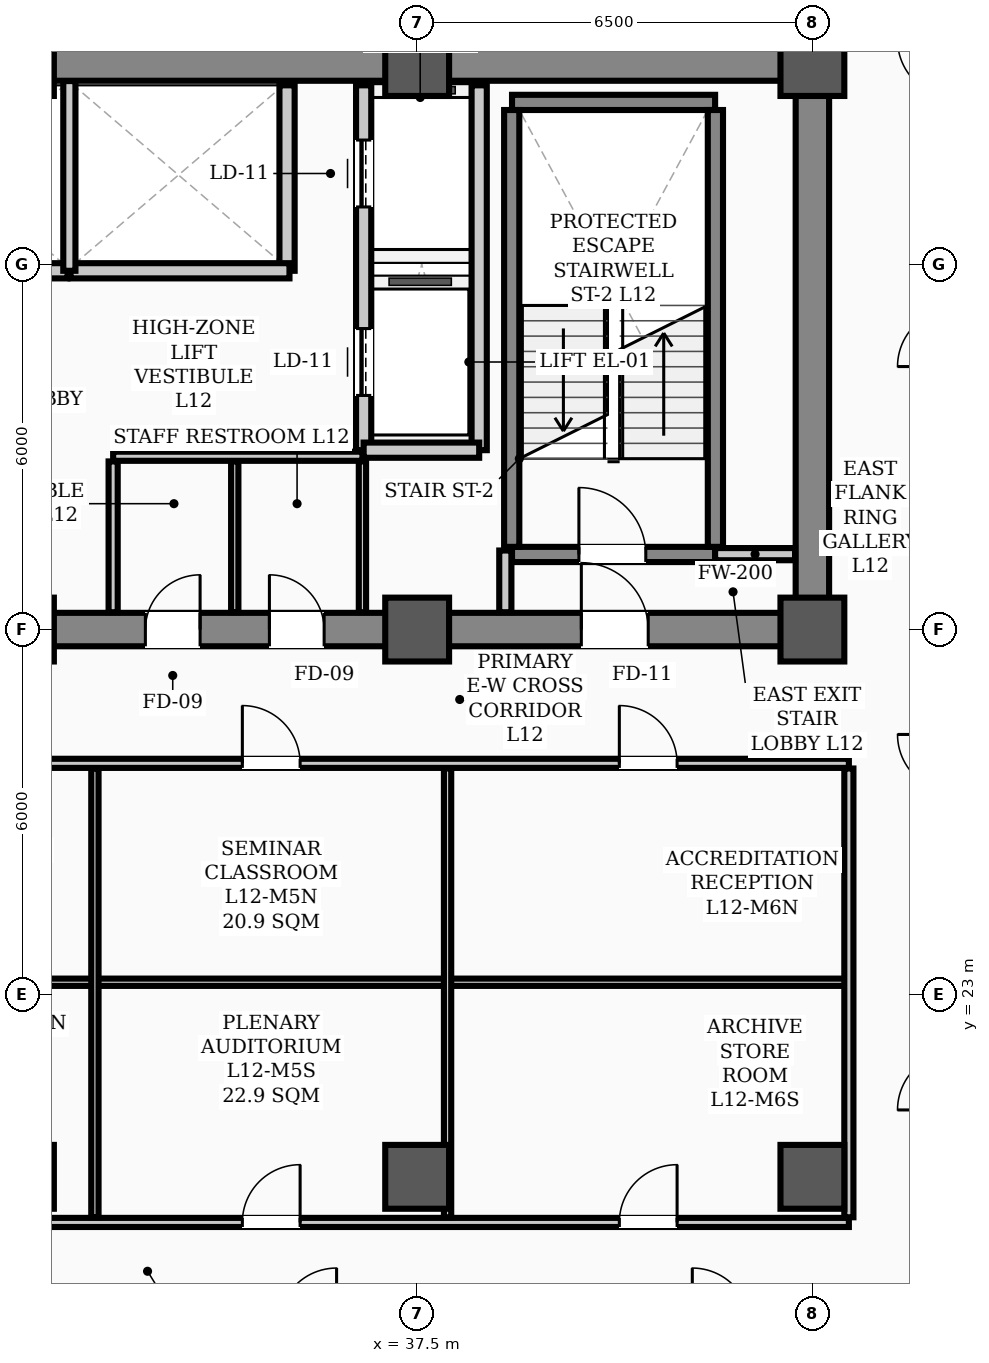
"""IFC4 building model, lengths in metres.
Left out: names, types, materials, properties, quantities, classifications, styles, units other than length and angle.
Written with IfcOpenShell. Run it as: python <this file> out.ifc"""

import sys

from ifc_helpers import new_model, si_unit, direction, frame, frame_2d, origin, origin_2d, place, context, subcontext, project, spatial, rectangle, hollow_rectangle, extrude, element, fill, save


model = new_model("IFC4")
c1 = context("Model", 3, precision=1e-05, world=origin(), true_north=direction((0.0, 1.0)))
c2 = subcontext(c1, "Body", "Model", "MODEL_VIEW")
j1 = project(units=[si_unit("LENGTHUNIT", "METRE"), si_unit("PLANEANGLEUNIT", "RADIAN")], contexts=[c1])
p1 = place(None, origin())
s1 = spatial("IfcSite", under=j1, at=p1, CompositionType="ELEMENT")
p2 = place(p1, origin())
s2 = spatial("IfcBuilding", under=s1, at=p2, CompositionType="ELEMENT")
p3 = place(p2, frame((0.0, 0.0, 49.9)))
s3 = spatial("IfcBuildingStorey", under=s2, at=p3, CompositionType="ELEMENT", Elevation=49.9)
for number, where, z_axis, x_axis in (
    (1, (31.0, 29.0, 0.0), (0.0, 0.0, 1.0), (1.0, 0.0, 0.0)),
    (2, (31.0, 38.3, 0.0), (0.0, 0.0, 1.0), (1.0, 0.0, 0.0)),
    (3, (37.5, 29.0, 0.0), (0.0, 0.0, 1.0), (1.0, 0.0, 0.0)),
    (4, (37.5, 38.3, 0.0), (0.0, 0.0, 1.0), (1.0, 0.0, 0.0)),
    (5, (44.0, 29.0, 0.0), (0.0, 0.0, 1.0), (1.0, 0.0, 0.0)),
    (6, (44.0, 38.3, 0.0), (0.0, 0.0, 1.0), (1.0, 0.0, 0.0)),
    (7, (31.0, 20.0, 0.0), (0.0, 0.0, 1.0), (1.0, 0.0, 0.0)),
    (8, (37.5, 20.0, 0.0), (0.0, 0.0, 1.0), (1.0, 0.0, 0.0)),
    (9, (44.0, 20.0, 0.0), (0.0, 0.0, 1.0), (1.0, 0.0, 0.0)),
):
    element("IfcColumn", number, at=place(p3, frame(where, z_axis=z_axis, x_axis=x_axis)), inside=s3, PredefinedType="COLUMN", context=c2, shape_type="SweptSolid", body=[
        extrude(hollow_rectangle(XDim=1.05, YDim=1.05, WallThickness=0.038, InnerFilletRadius=0.019, OuterFilletRadius=0.057, at=origin_2d()), origin(), (0.0, 0.0, 1.0), 3.9),
    ])
p4 = place(p3, frame((13.5, 29.0, 0.0), z_axis=(0.0, 0.0, 1.0), x_axis=(1.0, 0.0, 0.0)))
e10 = element("IfcWall", 10, at=p4, inside=s3, PredefinedType="SHEAR", context=c2, shape_type="SweptSolid", body=[
    extrude(rectangle(XDim=30.5, YDim=0.55, at=frame_2d((15.25, 0.0))), origin(), (0.0, 0.0, 1.0), 3.66),
])
p5 = place(p4, frame((1.75, 0.0, 0.0)))
e11 = element("IfcOpeningElement", 11, at=p5, cuts=e10, PredefinedType="OPENING", context=c2, shape_type="SweptSolid", body=[
    extrude(rectangle(XDim=1.1, YDim=2.08, at=frame_2d((0.55, 1.04))), frame((0.0, 0.285, 0.0), z_axis=(0.0, -1.0, 0.0), x_axis=(1.0, 0.0, 0.0)), (0.0, 0.0, 1.0), 0.57),
])
p6 = place(p4, frame((26.7, 0.0, 0.0)))
e12 = element("IfcOpeningElement", 12, at=p6, cuts=e10, PredefinedType="OPENING", context=c2, shape_type="SweptSolid", body=[
    extrude(rectangle(XDim=1.1, YDim=2.08, at=frame_2d((0.55, 1.04))), frame((0.0, 0.285, 0.0), z_axis=(0.0, -1.0, 0.0), x_axis=(1.0, 0.0, 0.0)), (0.0, 0.0, 1.0), 0.57),
])
p7 = place(p4, frame((6.8, 0.0, 0.0)))
e13 = element("IfcOpeningElement", 13, at=p7, cuts=e10, PredefinedType="OPENING", context=c2, shape_type="SweptSolid", body=[
    extrude(rectangle(XDim=1.1, YDim=2.08, at=frame_2d((0.55, 1.04))), frame((0.0, 0.285, 0.0), z_axis=(0.0, -1.0, 0.0), x_axis=(1.0, 0.0, 0.0)), (0.0, 0.0, 1.0), 0.57),
])
p8 = place(p4, frame((13.2, 0.0, 0.0)))
e14 = element("IfcOpeningElement", 14, at=p8, cuts=e10, PredefinedType="OPENING", context=c2, shape_type="SweptSolid", body=[
    extrude(rectangle(XDim=1.6, YDim=2.08, at=frame_2d((0.8, 1.04))), frame((0.0, 0.285, 0.0), z_axis=(0.0, -1.0, 0.0), x_axis=(1.0, 0.0, 0.0)), (0.0, 0.0, 1.0), 0.57),
])
p9 = place(p4, frame((19.53, 0.0, 0.0)))
e15 = element("IfcOpeningElement", 15, at=p9, cuts=e10, PredefinedType="OPENING", context=c2, shape_type="SweptSolid", body=[
    extrude(rectangle(XDim=0.9, YDim=2.08, at=frame_2d((0.45, 1.04))), frame((0.0, 0.285, 0.0), z_axis=(0.0, -1.0, 0.0), x_axis=(1.0, 0.0, 0.0)), (0.0, 0.0, 1.0), 0.57),
])
p10 = place(p4, frame((21.57, 0.0, 0.0)))
e16 = element("IfcOpeningElement", 16, at=p10, cuts=e10, PredefinedType="OPENING", context=c2, shape_type="SweptSolid", body=[
    extrude(rectangle(XDim=0.9, YDim=2.08, at=frame_2d((0.45, 1.04))), frame((0.0, 0.285, 0.0), z_axis=(0.0, -1.0, 0.0), x_axis=(1.0, 0.0, 0.0)), (0.0, 0.0, 1.0), 0.57),
])
p11 = place(p3, frame((13.5, 38.3, 0.0), z_axis=(0.0, 0.0, 1.0), x_axis=(1.0, 0.0, 0.0)))
e17 = element("IfcWall", 17, at=p11, inside=s3, PredefinedType="SHEAR", context=c2, shape_type="SweptSolid", body=[
    extrude(rectangle(XDim=30.5, YDim=0.55, at=frame_2d((15.25, 0.0))), origin(), (0.0, 0.0, 1.0), 3.66),
])
p12 = place(p3, frame((44.0, 29.35, 0.0), z_axis=(0.0, 0.0, 1.0), x_axis=(0.0, 1.0, 0.0)))
e18 = element("IfcWall", 18, at=p12, inside=s3, PredefinedType="SHEAR", context=c2, shape_type="SweptSolid", body=[
    extrude(rectangle(XDim=8.6, YDim=0.55, at=frame_2d((4.3, 0.0))), origin(), (0.0, 0.0, 1.0), 3.66),
])
p13 = place(p3, frame((39.06, 30.235, 0.0), z_axis=(0.0, 0.0, 1.0), x_axis=(1.0, 0.0, 0.0)))
e19 = element("IfcWall", 19, at=p13, inside=s3, PredefinedType="STANDARD", context=c2, shape_type="SweptSolid", body=[
    extrude(rectangle(XDim=3.34, YDim=0.25, at=frame_2d((1.67, 0.0))), origin(), (0.0, 0.0, 1.0), 3.66),
])
p14 = place(p13, frame((1.1, 0.0, 0.0)))
e20 = element("IfcOpeningElement", 20, at=p14, cuts=e19, PredefinedType="OPENING", context=c2, shape_type="SweptSolid", body=[
    extrude(rectangle(XDim=1.1, YDim=2.08, at=frame_2d((0.55, 1.04))), frame((0.0, 0.135, 0.0), z_axis=(0.0, -1.0, 0.0), x_axis=(1.0, 0.0, 0.0)), (0.0, 0.0, 1.0), 0.27),
])
p15 = place(p3, frame((39.06, 37.669, 0.0), z_axis=(0.0, 0.0, 1.0), x_axis=(1.0, 0.0, 0.0)))
e21 = element("IfcWall", 21, at=p15, inside=s3, PredefinedType="STANDARD", context=c2, shape_type="SweptSolid", body=[
    extrude(rectangle(XDim=3.34, YDim=0.25, at=frame_2d((1.67, 0.0))), origin(), (0.0, 0.0, 1.0), 3.66),
])
for number, where, z_axis, x_axis in (
    (22, (39.055, 30.36, 0.0), (0.0, 0.0, 1.0), (0.0, 1.0, 0.0)),
    (23, (42.405, 30.36, 0.0), (0.0, 0.0, 1.0), (0.0, 1.0, 0.0)),
):
    element("IfcWall", number, at=place(p3, frame(where, z_axis=z_axis, x_axis=x_axis)), inside=s3, PredefinedType="STANDARD", context=c2, shape_type="SweptSolid", body=[
        extrude(rectangle(XDim=7.184, YDim=0.25, at=frame_2d((3.592, 0.0))), origin(), (0.0, 0.0, 1.0), 3.66),
    ])
p16 = place(p3, frame((36.62, 31.95, 0.0), z_axis=(0.0, 0.0, 1.0), x_axis=(0.0, 1.0, 0.0)))
e24 = element("IfcWall", 24, at=p16, inside=s3, PredefinedType="STANDARD", context=c2, shape_type="SweptSolid", body=[
    extrude(rectangle(XDim=6.0, YDim=0.25, at=frame_2d((3.0, 0.0))), origin(), (0.0, 0.0, 1.0), 2.24),
])
p17 = place(p16, frame((0.9, 0.0, 0.0)))
e25 = element("IfcOpeningElement", 25, at=p17, cuts=e24, PredefinedType="OPENING", context=c2, shape_type="SweptSolid", body=[
    extrude(rectangle(XDim=1.1, YDim=2.08, at=frame_2d((0.55, 1.04))), frame((0.0, 0.135, 0.0), z_axis=(0.0, -1.0, 0.0), x_axis=(1.0, 0.0, 0.0)), (0.0, 0.0, 1.0), 0.27),
])
p18 = place(p16, frame((4.0, 0.0, 0.0)))
e26 = element("IfcOpeningElement", 26, at=p18, cuts=e24, PredefinedType="OPENING", context=c2, shape_type="SweptSolid", body=[
    extrude(rectangle(XDim=1.1, YDim=2.08, at=frame_2d((0.55, 1.04))), frame((0.0, 0.135, 0.0), z_axis=(0.0, -1.0, 0.0), x_axis=(1.0, 0.0, 0.0)), (0.0, 0.0, 1.0), 0.27),
])
p19 = place(p3, frame((38.52, 31.95, 0.0), z_axis=(0.0, 0.0, 1.0), x_axis=(0.0, 1.0, 0.0)))
e27 = element("IfcWall", 27, at=p19, inside=s3, PredefinedType="STANDARD", context=c2, shape_type="SweptSolid", body=[
    extrude(rectangle(XDim=6.0, YDim=0.25, at=frame_2d((3.0, 0.0))), origin(), (0.0, 0.0, 1.0), 2.24),
])
p20 = place(p3, frame((36.62, 31.95, 0.0), z_axis=(0.0, 0.0, 1.0), x_axis=(1.0, 0.0, 0.0)))
e28 = element("IfcWall", 28, at=p20, inside=s3, PredefinedType="STANDARD", context=c2, shape_type="SweptSolid", body=[
    extrude(rectangle(XDim=1.9, YDim=0.25, at=frame_2d((0.95, 0.0))), origin(), (0.0, 0.0, 1.0), 3.48),
])
p21 = place(p3, frame((35.36, 34.9, 0.0), z_axis=(0.0, 0.0, 1.0), x_axis=(0.0, 1.0, 0.0)))
e29 = element("IfcWall", 29, at=p21, inside=s3, PredefinedType="STANDARD", context=c2, shape_type="SweptSolid", body=[
    extrude(rectangle(XDim=3.05, YDim=0.25, at=frame_2d((1.525, 0.0))), origin(), (0.0, 0.0, 1.0), 2.24),
])
p22 = place(p3, frame((28.2, 34.9, 0.0), z_axis=(0.0, 0.0, 1.0), x_axis=(1.0, 0.0, 0.0)))
e30 = element("IfcWall", 30, at=p22, inside=s3, PredefinedType="STANDARD", context=c2, shape_type="SweptSolid", body=[
    extrude(rectangle(XDim=3.55, YDim=0.25, at=frame_2d((1.775, 0.0))), origin(), (0.0, 0.0, 1.0), 3.66),
])
p23 = place(p3, frame((31.8, 34.9, 0.0), z_axis=(0.0, 0.0, 1.0), x_axis=(1.0, 0.0, 0.0)))
e31 = element("IfcWall", 31, at=p23, inside=s3, PredefinedType="STANDARD", context=c2, shape_type="SweptSolid", body=[
    extrude(rectangle(XDim=3.6, YDim=0.25, at=frame_2d((1.8, 0.0))), origin(), (0.0, 0.0, 1.0), 3.66),
])
p24 = place(p3, frame((42.4, 30.24, 0.0), z_axis=(0.0, 0.0, 1.0), x_axis=(1.0, 0.0, 0.0)))
e32 = element("IfcWall", 32, at=p24, inside=s3, PredefinedType="STANDARD", context=c2, shape_type="SweptSolid", body=[
    extrude(rectangle(XDim=1.315, YDim=0.2, at=frame_2d((0.658, 0.0))), origin(), (0.0, 0.0, 1.0), 2.24),
])
p25 = place(p3, frame((32.5, 31.85, 0.0), z_axis=(0.0, 0.0, 1.0), x_axis=(1.0, 0.0, 0.0)))
e33 = element("IfcWall", 33, at=p25, inside=s3, PredefinedType="PARTITIONING", context=c2, shape_type="SweptSolid", body=[
    extrude(rectangle(XDim=4.1, YDim=0.15, at=frame_2d((2.05, 0.0))), origin(), (0.0, 0.0, 1.0), 3.66),
])
p26 = place(p3, frame((12.9, 26.8, 0.0), z_axis=(0.0, 0.0, 1.0), x_axis=(1.0, 0.0, 0.0)))
e34 = element("IfcWall", 34, at=p26, inside=s3, PredefinedType="PARTITIONING", context=c2, shape_type="SweptSolid", body=[
    extrude(rectangle(XDim=31.7, YDim=0.15, at=frame_2d((15.85, 0.0))), origin(), (0.0, 0.0, 1.0), 2.24),
])
p27 = place(p26, frame((13.6, 0.0, 0.0)))
e35 = element("IfcOpeningElement", 35, at=p27, cuts=e34, PredefinedType="OPENING", context=c2, shape_type="SweptSolid", body=[
    extrude(rectangle(XDim=1.6, YDim=2.08, at=frame_2d((0.8, 1.04))), frame((0.0, 0.085, 0.0), z_axis=(0.0, -1.0, 0.0), x_axis=(1.0, 0.0, 0.0)), (0.0, 0.0, 1.0), 0.17),
])
p28 = place(p26, frame((2.175, 0.0, 0.0)))
e36 = element("IfcOpeningElement", 36, at=p28, cuts=e34, PredefinedType="OPENING", context=c2, shape_type="SweptSolid", body=[
    extrude(rectangle(XDim=0.95, YDim=2.08, at=frame_2d((0.475, 1.04))), frame((0.0, 0.085, 0.0), z_axis=(0.0, -1.0, 0.0), x_axis=(1.0, 0.0, 0.0)), (0.0, 0.0, 1.0), 0.17),
])
p29 = place(p26, frame((6.925, 0.0, 0.0)))
e37 = element("IfcOpeningElement", 37, at=p29, cuts=e34, PredefinedType="OPENING", context=c2, shape_type="SweptSolid", body=[
    extrude(rectangle(XDim=0.95, YDim=2.08, at=frame_2d((0.475, 1.04))), frame((0.0, 0.085, 0.0), z_axis=(0.0, -1.0, 0.0), x_axis=(1.0, 0.0, 0.0)), (0.0, 0.0, 1.0), 0.17),
])
p30 = place(p26, frame((10.925, 0.0, 0.0)))
e38 = element("IfcOpeningElement", 38, at=p30, cuts=e34, PredefinedType="OPENING", context=c2, shape_type="SweptSolid", body=[
    extrude(rectangle(XDim=0.95, YDim=2.08, at=frame_2d((0.475, 1.04))), frame((0.0, 0.085, 0.0), z_axis=(0.0, -1.0, 0.0), x_axis=(1.0, 0.0, 0.0)), (0.0, 0.0, 1.0), 0.17),
])
p31 = place(p26, frame((16.025, 0.0, 0.0)))
e39 = element("IfcOpeningElement", 39, at=p31, cuts=e34, PredefinedType="OPENING", context=c2, shape_type="SweptSolid", body=[
    extrude(rectangle(XDim=0.95, YDim=2.08, at=frame_2d((0.475, 1.04))), frame((0.0, 0.085, 0.0), z_axis=(0.0, -1.0, 0.0), x_axis=(1.0, 0.0, 0.0)), (0.0, 0.0, 1.0), 0.17),
])
p32 = place(p26, frame((21.725, 0.0, 0.0)))
e40 = element("IfcOpeningElement", 40, at=p32, cuts=e34, PredefinedType="OPENING", context=c2, shape_type="SweptSolid", body=[
    extrude(rectangle(XDim=0.95, YDim=2.08, at=frame_2d((0.475, 1.04))), frame((0.0, 0.085, 0.0), z_axis=(0.0, -1.0, 0.0), x_axis=(1.0, 0.0, 0.0)), (0.0, 0.0, 1.0), 0.17),
])
p33 = place(p26, frame((27.925, 0.0, 0.0)))
e41 = element("IfcOpeningElement", 41, at=p33, cuts=e34, PredefinedType="OPENING", context=c2, shape_type="SweptSolid", body=[
    extrude(rectangle(XDim=0.95, YDim=2.08, at=frame_2d((0.475, 1.04))), frame((0.0, 0.085, 0.0), z_axis=(0.0, -1.0, 0.0), x_axis=(1.0, 0.0, 0.0)), (0.0, 0.0, 1.0), 0.17),
])
p34 = place(p3, frame((28.4, 19.25, 0.0), z_axis=(0.0, 0.0, 1.0), x_axis=(1.0, 0.0, 0.0)))
e42 = element("IfcWall", 42, at=p34, inside=s3, PredefinedType="PARTITIONING", context=c2, shape_type="SweptSolid", body=[
    extrude(rectangle(XDim=16.2, YDim=0.15, at=frame_2d((8.1, 0.0))), origin(), (0.0, 0.0, 1.0), 2.24),
])
p35 = place(p34, frame((0.525, 0.0, 0.0)))
e43 = element("IfcOpeningElement", 43, at=p35, cuts=e42, PredefinedType="OPENING", context=c2, shape_type="SweptSolid", body=[
    extrude(rectangle(XDim=0.95, YDim=2.08, at=frame_2d((0.475, 1.04))), frame((0.0, 0.085, 0.0), z_axis=(0.0, -1.0, 0.0), x_axis=(1.0, 0.0, 0.0)), (0.0, 0.0, 1.0), 0.17),
])
p36 = place(p34, frame((6.225, 0.0, 0.0)))
e44 = element("IfcOpeningElement", 44, at=p36, cuts=e42, PredefinedType="OPENING", context=c2, shape_type="SweptSolid", body=[
    extrude(rectangle(XDim=0.95, YDim=2.08, at=frame_2d((0.475, 1.04))), frame((0.0, 0.085, 0.0), z_axis=(0.0, -1.0, 0.0), x_axis=(1.0, 0.0, 0.0)), (0.0, 0.0, 1.0), 0.17),
])
p37 = place(p34, frame((12.425, 0.0, 0.0)))
e45 = element("IfcOpeningElement", 45, at=p37, cuts=e42, PredefinedType="OPENING", context=c2, shape_type="SweptSolid", body=[
    extrude(rectangle(XDim=0.95, YDim=2.08, at=frame_2d((0.475, 1.04))), frame((0.0, 0.085, 0.0), z_axis=(0.0, -1.0, 0.0), x_axis=(1.0, 0.0, 0.0)), (0.0, 0.0, 1.0), 0.17),
])
p38 = place(p3, frame((28.4, 23.2, 0.0), z_axis=(0.0, 0.0, 1.0), x_axis=(1.0, 0.0, 0.0)))
e46 = element("IfcWall", 46, at=p38, inside=s3, PredefinedType="PARTITIONING", context=c2, shape_type="SweptSolid", body=[
    extrude(rectangle(XDim=3.8, YDim=0.12, at=frame_2d((1.9, 0.0))), origin(), (0.0, 0.0, 1.0), 2.24),
])
p39 = place(p3, frame((32.2, 23.2, 0.0), z_axis=(0.0, 0.0, 1.0), x_axis=(1.0, 0.0, 0.0)))
e47 = element("IfcWall", 47, at=p39, inside=s3, PredefinedType="PARTITIONING", context=c2, shape_type="SweptSolid", body=[
    extrude(rectangle(XDim=5.8, YDim=0.12, at=frame_2d((2.9, 0.0))), origin(), (0.0, 0.0, 1.0), 2.24),
])
p40 = place(p3, frame((38.0, 23.2, 0.0), z_axis=(0.0, 0.0, 1.0), x_axis=(1.0, 0.0, 0.0)))
e48 = element("IfcWall", 48, at=p40, inside=s3, PredefinedType="PARTITIONING", context=c2, shape_type="SweptSolid", body=[
    extrude(rectangle(XDim=6.6, YDim=0.12, at=frame_2d((3.3, 0.0))), origin(), (0.0, 0.0, 1.0), 2.24),
])
p41 = place(p3, frame((38.95, 29.285, 0.0), z_axis=(0.0, 0.0, 1.0), x_axis=(0.0, 1.0, 0.0)))
e49 = element("IfcWall", 49, at=p41, inside=s3, PredefinedType="STANDARD", context=c2, shape_type="SweptSolid", body=[
    extrude(rectangle(XDim=1.015, YDim=0.2, at=frame_2d((0.508, 0.0))), origin(), (0.0, 0.0, 1.0), 2.24),
])
p42 = place(p3, frame((32.5, 29.285, 0.0), z_axis=(0.0, 0.0, 1.0), x_axis=(0.0, 1.0, 0.0)))
e50 = element("IfcWall", 50, at=p42, inside=s3, PredefinedType="PARTITIONING", context=c2, shape_type="SweptSolid", body=[
    extrude(rectangle(XDim=2.48, YDim=0.15, at=frame_2d((1.24, 0.0))), origin(), (0.0, 0.0, 1.0), 2.24),
])
for number, where, z_axis, x_axis in (
    (51, (36.6, 29.285, 0.0), (0.0, 0.0, 1.0), (0.0, 1.0, 0.0)),
    (52, (34.5, 29.285, 0.0), (0.0, 0.0, 1.0), (0.0, 1.0, 0.0)),
):
    element("IfcWall", number, at=place(p3, frame(where, z_axis=z_axis, x_axis=x_axis)), inside=s3, PredefinedType="PARTITIONING", context=c2, shape_type="SweptSolid", body=[
        extrude(rectangle(XDim=2.48, YDim=0.12, at=frame_2d((1.24, 0.0))), origin(), (0.0, 0.0, 1.0), 2.24),
    ])
p43 = place(p3, frame((44.6, 19.335, 0.0), z_axis=(0.0, 0.0, 1.0), x_axis=(0.0, 1.0, 0.0)))
e53 = element("IfcWall", 53, at=p43, inside=s3, PredefinedType="PARTITIONING", context=c2, shape_type="SweptSolid", body=[
    extrude(rectangle(XDim=7.38, YDim=0.15, at=frame_2d((3.69, 0.0))), origin(), (0.0, 0.0, 1.0), 2.24),
])
for number, where, z_axis, x_axis in (
    (54, (32.2, 19.335, 0.0), (0.0, 0.0, 1.0), (0.0, 1.0, 0.0)),
    (55, (38.0, 19.335, 0.0), (0.0, 0.0, 1.0), (0.0, 1.0, 0.0)),
):
    element("IfcWall", number, at=place(p3, frame(where, z_axis=z_axis, x_axis=x_axis)), inside=s3, PredefinedType="PARTITIONING", context=c2, shape_type="SweptSolid", body=[
        extrude(rectangle(XDim=7.38, YDim=0.12, at=frame_2d((3.69, 0.0))), origin(), (0.0, 0.0, 1.0), 2.24),
    ])
p44 = place(p3, frame((31.78, 34.9, 0.0), z_axis=(0.0, 0.0, 1.0), x_axis=(0.0, 1.0, 0.0)))
e56 = element("IfcWall", 56, at=p44, inside=s3, PredefinedType="STANDARD", context=c2, shape_type="SweptSolid", body=[
    extrude(rectangle(XDim=3.12, YDim=0.2, at=frame_2d((1.56, 0.0))), origin(), (0.0, 0.0, 1.0), 2.24),
])
p45 = place(p14, origin())
e57 = element("IfcDoor", 57, at=p45, inside=s3, OperationType="SINGLE_SWING_LEFT", PredefinedType="DOOR", context=c2, shape_type="SweptSolid", body=[
    extrude(rectangle(XDim=1.1, YDim=2.08, at=frame_2d((0.55, 1.04))), frame((0.0, 0.025, 0.0), z_axis=(0.0, -1.0, 0.0), x_axis=(1.0, 0.0, 0.0)), (0.0, 0.0, 1.0), 0.05),
])
fill(e20, e57)
p46 = place(p6, origin())
e58 = element("IfcDoor", 58, at=p46, inside=s3, OperationType="SINGLE_SWING_LEFT", PredefinedType="DOOR", context=c2, shape_type="SweptSolid", body=[
    extrude(rectangle(XDim=1.1, YDim=2.08, at=frame_2d((0.55, 1.04))), frame((0.0, 0.025, 0.0), z_axis=(0.0, -1.0, 0.0), x_axis=(1.0, 0.0, 0.0)), (0.0, 0.0, 1.0), 0.05),
])
fill(e12, e58)
p47 = place(p9, origin())
e59 = element("IfcDoor", 59, at=p47, inside=s3, OperationType="SINGLE_SWING_RIGHT", PredefinedType="DOOR", context=c2, shape_type="SweptSolid", body=[
    extrude(rectangle(XDim=0.9, YDim=2.08, at=frame_2d((0.45, 1.04))), frame((0.0, 0.025, 0.0), z_axis=(0.0, -1.0, 0.0), x_axis=(1.0, 0.0, 0.0)), (0.0, 0.0, 1.0), 0.05),
])
fill(e15, e59)
p48 = place(p10, origin())
e60 = element("IfcDoor", 60, at=p48, inside=s3, OperationType="SINGLE_SWING_LEFT", PredefinedType="DOOR", context=c2, shape_type="SweptSolid", body=[
    extrude(rectangle(XDim=0.9, YDim=2.08, at=frame_2d((0.45, 1.04))), frame((0.0, 0.025, 0.0), z_axis=(0.0, -1.0, 0.0), x_axis=(1.0, 0.0, 0.0)), (0.0, 0.0, 1.0), 0.05),
])
fill(e16, e60)
p49 = place(p32, origin())
e61 = element("IfcDoor", 61, at=p49, inside=s3, OperationType="SINGLE_SWING_LEFT", PredefinedType="DOOR", context=c2, shape_type="SweptSolid", body=[
    extrude(rectangle(XDim=0.95, YDim=2.08, at=frame_2d((0.475, 1.04))), frame((0.0, 0.025, 0.0), z_axis=(0.0, -1.0, 0.0), x_axis=(1.0, 0.0, 0.0)), (0.0, 0.0, 1.0), 0.05),
])
fill(e40, e61)
p50 = place(p36, origin())
e62 = element("IfcDoor", 62, at=p50, inside=s3, OperationType="SINGLE_SWING_RIGHT", PredefinedType="DOOR", context=c2, shape_type="SweptSolid", body=[
    extrude(rectangle(XDim=0.95, YDim=2.08, at=frame_2d((0.475, 1.04))), frame((0.0, 0.025, 0.0), z_axis=(0.0, -1.0, 0.0), x_axis=(1.0, 0.0, 0.0)), (0.0, 0.0, 1.0), 0.05),
])
fill(e44, e62)
p51 = place(p33, origin())
e63 = element("IfcDoor", 63, at=p51, inside=s3, OperationType="SINGLE_SWING_LEFT", PredefinedType="DOOR", context=c2, shape_type="SweptSolid", body=[
    extrude(rectangle(XDim=0.95, YDim=2.08, at=frame_2d((0.475, 1.04))), frame((0.0, 0.025, 0.0), z_axis=(0.0, -1.0, 0.0), x_axis=(1.0, 0.0, 0.0)), (0.0, 0.0, 1.0), 0.05),
])
fill(e41, e63)
p52 = place(p37, origin())
e64 = element("IfcDoor", 64, at=p52, inside=s3, OperationType="SINGLE_SWING_RIGHT", PredefinedType="DOOR", context=c2, shape_type="SweptSolid", body=[
    extrude(rectangle(XDim=0.95, YDim=2.08, at=frame_2d((0.475, 1.04))), frame((0.0, 0.025, 0.0), z_axis=(0.0, -1.0, 0.0), x_axis=(1.0, 0.0, 0.0)), (0.0, 0.0, 1.0), 0.05),
])
fill(e45, e64)
p53 = place(p17, origin())
e65 = element("IfcDoor", 65, at=p53, inside=s3, OperationType="SLIDING_TO_LEFT", PredefinedType="DOOR", context=c2, shape_type="SweptSolid", body=[
    extrude(rectangle(XDim=1.1, YDim=2.08, at=frame_2d((0.55, 1.04))), frame((0.0, 0.025, 0.0), z_axis=(0.0, -1.0, 0.0), x_axis=(1.0, 0.0, 0.0)), (0.0, 0.0, 1.0), 0.05),
])
fill(e25, e65)
p54 = place(p18, origin())
e66 = element("IfcDoor", 66, at=p54, inside=s3, OperationType="SLIDING_TO_LEFT", PredefinedType="DOOR", context=c2, shape_type="SweptSolid", body=[
    extrude(rectangle(XDim=1.1, YDim=2.08, at=frame_2d((0.55, 1.04))), frame((0.0, 0.025, 0.0), z_axis=(0.0, -1.0, 0.0), x_axis=(1.0, 0.0, 0.0)), (0.0, 0.0, 1.0), 0.05),
])
fill(e26, e66)
save(model, sys.argv[1])
